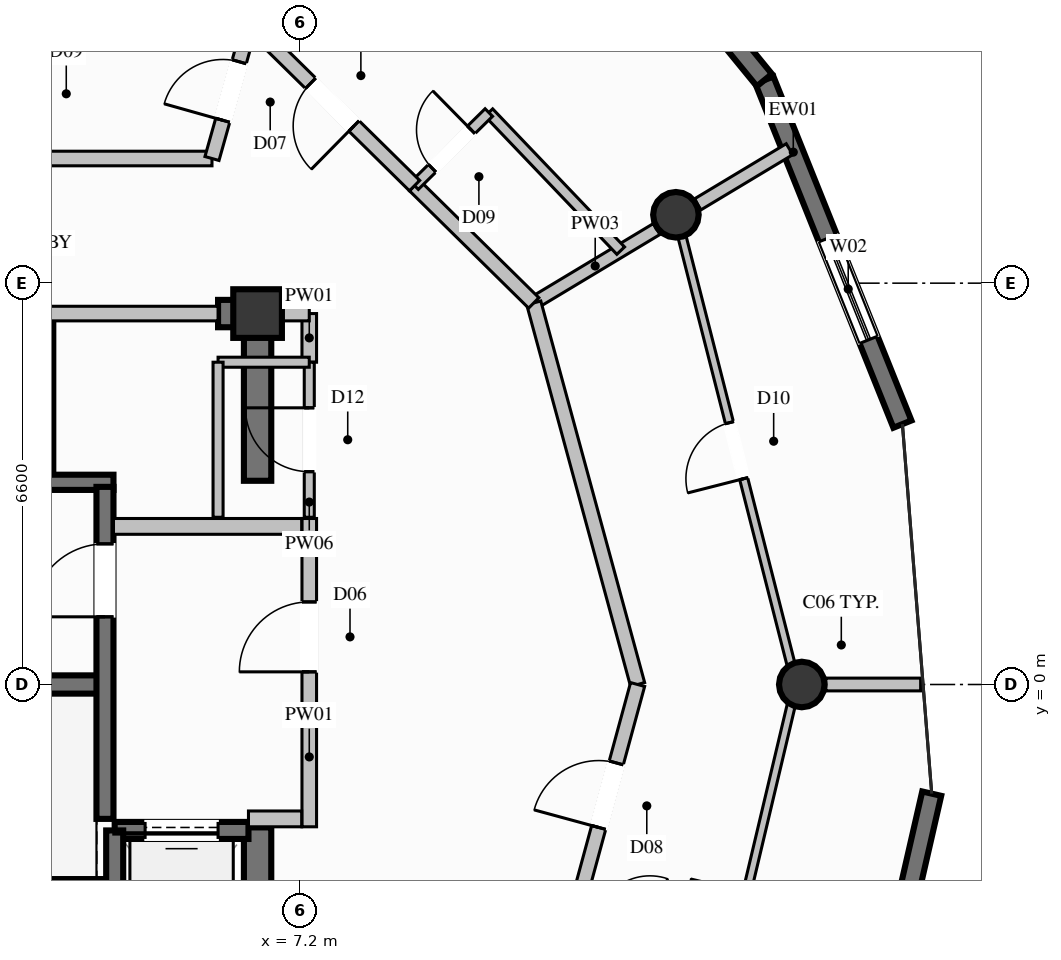
"""IFC4 building model, lengths in metres.
Left out: names, types, materials, properties, quantities, classifications, styles, units other than length and angle.
Written with IfcOpenShell. Run it as: python <this file> out.ifc"""

import sys

from ifc_helpers import new_model, si_unit, direction, frame, frame_2d, origin, origin_2d, place, context, subcontext, project, spatial, rectangle, circle, extrude, element, fill, save


model = new_model("IFC4")
c1 = context("Model", 3, precision=1e-05, world=origin(), true_north=direction((0.0, 1.0)))
c2 = subcontext(c1, "Body", "Model", "MODEL_VIEW")
j1 = project(units=[si_unit("LENGTHUNIT", "METRE"), si_unit("PLANEANGLEUNIT", "RADIAN")], contexts=[c1])
p1 = place(None, origin())
s1 = spatial("IfcSite", under=j1, at=p1, CompositionType="ELEMENT")
p2 = place(p1, origin())
s2 = spatial("IfcBuilding", under=s1, at=p2, CompositionType="ELEMENT")
p3 = place(p2, frame((0.0, 0.0, 246.8)))
s3 = spatial("IfcBuildingStorey", under=s2, at=p3, CompositionType="ELEMENT", Elevation=246.8)
p4 = place(p3, frame((6.5, 6.1, 0.0), z_axis=(0.0, 0.0, 1.0), x_axis=(1.0, 0.0, 0.0)))
e1 = element("IfcColumn", 1, at=p4, inside=s3, PredefinedType="COLUMN", context=c2, shape_type="SweptSolid", body=[
    extrude(rectangle(XDim=0.8, YDim=0.8, at=origin_2d()), origin(), (0.0, 0.0, 1.0), 3.8),
])
p5 = place(p3, frame((-3.99, 0.0, 0.0), z_axis=(0.0, 0.0, 1.0), x_axis=(1.0, 0.0, 0.0)))
e2 = element("IfcWall", 2, at=p5, inside=s3, PredefinedType="SHEAR", context=c2, shape_type="SweptSolid", body=[
    extrude(rectangle(XDim=7.98, YDim=0.3, at=frame_2d((3.99, 0.0))), origin(), (0.0, 0.0, 1.0), 3.8),
])
for number, where, z_axis, x_axis in (
    (3, (-4.13, -3.325, 0.0), (0.0, 0.0, 1.0), (1.0, 0.0, 0.0)),
    (4, (-4.13, 3.325, 0.0), (0.0, 0.0, 1.0), (1.0, 0.0, 0.0)),
):
    element("IfcWall", number, at=place(p3, frame(where, z_axis=z_axis, x_axis=x_axis)), inside=s3, PredefinedType="SOLIDWALL", context=c2, shape_type="SweptSolid", body=[
        extrude(rectangle(XDim=8.26, YDim=0.25, at=frame_2d((4.13, 0.0))), origin(), (0.0, 0.0, 1.0), 3.8),
    ])
p6 = place(p3, frame((5.85, 6.1, 0.0), z_axis=(0.0, 0.0, 1.0), x_axis=(1.0, 0.0, 0.0)))
e5 = element("IfcWall", 5, at=p6, inside=s3, PredefinedType="SHEAR", context=c2, shape_type="SweptSolid", body=[
    extrude(rectangle(XDim=0.425, YDim=0.45, at=frame_2d((0.212, 0.0))), origin(), (0.0, 0.0, 1.0), 3.8),
])
p7 = place(p3, frame((6.5, -6.325, 0.0), z_axis=(0.0, 0.0, 1.0), x_axis=(0.0, 1.0, 0.0)))
e6 = element("IfcWall", 6, at=p7, inside=s3, PredefinedType="SHEAR", context=c2, shape_type="SweptSolid", body=[
    extrude(rectangle(XDim=3.975, YDim=0.45, at=frame_2d((1.987, 0.0))), origin(), (0.0, 0.0, 1.0), 3.8),
])
p8 = place(p3, frame((6.5, 3.35, 0.0), z_axis=(0.0, 0.0, 1.0), x_axis=(0.0, 1.0, 0.0)))
e7 = element("IfcWall", 7, at=p8, inside=s3, PredefinedType="SHEAR", context=c2, shape_type="SweptSolid", body=[
    extrude(rectangle(XDim=2.975, YDim=0.45, at=frame_2d((1.487, 0.0))), origin(), (0.0, 0.0, 1.0), 3.8),
])
for number, where, z_axis, x_axis in (
    (8, (15.45, 0.0, 0.0), (0.0, 0.0, 1.0), (1.0, 0.0, 0.0)),
    (9, (13.38, 7.725, 0.0), (0.0, 0.0, 1.0), (1.0, 0.0, 0.0)),
):
    element("IfcColumn", number, at=place(p3, frame(where, z_axis=z_axis, x_axis=x_axis)), inside=s3, PredefinedType="COLUMN", context=c2, shape_type="SweptSolid", body=[
        extrude(circle(Radius=0.375, at=origin_2d()), origin(), (0.0, 0.0, 1.0), 3.8),
    ])
p9 = place(p3, frame((17.587, -1.795, 0.0), z_axis=(0.0, 0.0, 1.0), x_axis=(-0.223174159959, -0.974778587335, 0.0)))
e10 = element("IfcWall", 10, at=p9, inside=s3, PredefinedType="SOLIDWALL", context=c2, shape_type="SweptSolid", body=[
    extrude(rectangle(XDim=6.053, YDim=0.32, at=frame_2d((3.026, 0.0))), origin(), (0.0, 0.0, 1.0), 3.57),
])
p10 = place(p9, frame((2.126, 0.0, 0.35)))
e11 = element("IfcOpeningElement", 11, at=p10, cuts=e10, PredefinedType="OPENING", context=c2, shape_type="SweptSolid", body=[
    extrude(rectangle(XDim=1.8, YDim=2.6, at=frame_2d((0.9, 1.3))), frame((0.0, 0.17, 0.0), z_axis=(0.0, -1.0, 0.0), x_axis=(1.0, 0.0, 0.0)), (0.0, 0.0, 1.0), 0.34),
])
p11 = place(p3, frame((14.835, 9.939, 0.0), z_axis=(0.0, 0.0, 1.0), x_axis=(0.372412492589, -0.928067311871, 0.0)))
e12 = element("IfcWall", 12, at=p11, inside=s3, PredefinedType="SOLIDWALL", context=c2, shape_type="SweptSolid", body=[
    extrude(rectangle(XDim=6.095, YDim=0.32, at=frame_2d((3.048, 0.0))), origin(), (0.0, 0.0, 1.0), 3.57),
])
p12 = place(p11, frame((2.802, 0.0, 0.35)))
e13 = element("IfcOpeningElement", 13, at=p12, cuts=e12, PredefinedType="OPENING", context=c2, shape_type="SweptSolid", body=[
    extrude(rectangle(XDim=1.8, YDim=2.6, at=frame_2d((0.9, 1.3))), frame((0.0, 0.17, 0.0), z_axis=(0.0, -1.0, 0.0), x_axis=(1.0, 0.0, 0.0)), (0.0, 0.0, 1.0), 0.34),
])
p13 = place(p3, frame((11.001, 14.623, 0.0), z_axis=(0.0, 0.0, 1.0), x_axis=(0.633391522875, -0.773831492478, 0.0)))
e14 = element("IfcWall", 14, at=p13, inside=s3, PredefinedType="SOLIDWALL", context=c2, shape_type="SweptSolid", body=[
    extrude(rectangle(XDim=6.053, YDim=0.32, at=frame_2d((3.027, 0.0))), origin(), (0.0, 0.0, 1.0), 3.57),
])
p14 = place(p13, frame((2.127, 0.0, 0.35)))
e15 = element("IfcOpeningElement", 15, at=p14, cuts=e14, PredefinedType="OPENING", context=c2, shape_type="SweptSolid", body=[
    extrude(rectangle(XDim=1.8, YDim=2.6, at=frame_2d((0.9, 1.3))), frame((0.0, 0.17, 0.0), z_axis=(0.0, -1.0, 0.0), x_axis=(1.0, 0.0, 0.0)), (0.0, 0.0, 1.0), 0.34),
])
p15 = place(p3, frame((3.0, 3.5, 0.0), z_axis=(0.0, 0.0, 1.0), x_axis=(0.0, 1.0, 0.0)))
e16 = element("IfcWall", 16, at=p15, inside=s3, PredefinedType="SOLIDWALL", context=c2, shape_type="SweptSolid", body=[
    extrude(rectangle(XDim=2.5, YDim=0.28, at=frame_2d((1.25, 0.0))), origin(), (0.0, 0.0, 1.0), 3.57),
])
p16 = place(p3, frame((6.35, -2.4, 0.0), z_axis=(0.0, 0.0, 1.0), x_axis=(-1.0, 0.0, 0.0)))
e17 = element("IfcWall", 17, at=p16, inside=s3, PredefinedType="SOLIDWALL", context=c2, shape_type="SweptSolid", body=[
    extrude(rectangle(XDim=2.2, YDim=0.28, at=frame_2d((1.1, 0.0))), origin(), (0.0, 0.0, 1.0), 3.57),
])
p17 = place(p16, frame((0.5, 0.0, 0.0)))
e18 = element("IfcOpeningElement", 18, at=p17, cuts=e17, PredefinedType="OPENING", context=c2, shape_type="SweptSolid", body=[
    extrude(rectangle(XDim=1.2, YDim=2.2, at=frame_2d((0.6, 1.1))), frame((0.0, 0.15, 0.0), z_axis=(0.0, -1.0, 0.0), x_axis=(1.0, 0.0, 0.0)), (0.0, 0.0, 1.0), 0.3),
])
p18 = place(p3, frame((4.15, -2.4, 0.0), z_axis=(0.0, 0.0, 1.0), x_axis=(0.0, -1.0, 0.0)))
e19 = element("IfcWall", 19, at=p18, inside=s3, PredefinedType="SOLIDWALL", context=c2, shape_type="SweptSolid", body=[
    extrude(rectangle(XDim=2.7, YDim=0.28, at=frame_2d((1.35, 0.0))), origin(), (0.0, 0.0, 1.0), 3.57),
])
p19 = place(p3, frame((3.99, -2.21, 0.0), z_axis=(0.0, 0.0, 1.0), x_axis=(0.0, 1.0, 0.0)))
e20 = element("IfcWall", 20, at=p19, inside=s3, PredefinedType="SOLIDWALL", context=c2, shape_type="SweptSolid", body=[
    extrude(rectangle(XDim=5.46, YDim=0.28, at=frame_2d((2.73, 0.0))), origin(), (0.0, 0.0, 1.0), 3.57),
])
p20 = place(p19, frame((3.323, 0.0, 0.0)))
e21 = element("IfcOpeningElement", 21, at=p20, cuts=e20, PredefinedType="OPENING", context=c2, shape_type="SweptSolid", body=[
    extrude(rectangle(XDim=1.2, YDim=2.2, at=frame_2d((0.6, 1.1))), frame((0.0, 0.15, 0.0), z_axis=(0.0, -1.0, 0.0), x_axis=(1.0, 0.0, 0.0)), (0.0, 0.0, 1.0), 0.3),
])
p21 = place(p3, frame((7.35, -2.34, 0.0), z_axis=(0.0, 0.0, 1.0), x_axis=(0.0, 1.0, 0.0)))
e22 = element("IfcWall", 22, at=p21, inside=s3, PredefinedType="PARTITIONING", context=c2, shape_type="SweptSolid", body=[
    extrude(rectangle(XDim=5.07, YDim=0.24, at=frame_2d((2.535, 0.0))), origin(), (0.0, 0.0, 1.0), 2.655),
])
p22 = place(p21, frame((2.548, 0.0, 0.0)))
e23 = element("IfcOpeningElement", 23, at=p22, cuts=e22, PredefinedType="OPENING", context=c2, shape_type="SweptSolid", body=[
    extrude(rectangle(XDim=1.15, YDim=2.2, at=frame_2d((0.575, 1.1))), frame((0.0, 0.13, 0.0), z_axis=(0.0, -1.0, 0.0), x_axis=(1.0, 0.0, 0.0)), (0.0, 0.0, 1.0), 0.26),
])
p23 = place(p3, frame((6.35, -2.21, 0.0), z_axis=(0.0, 0.0, 1.0), x_axis=(1.0, 0.0, 0.0)))
e24 = element("IfcWall", 24, at=p23, inside=s3, PredefinedType="PARTITIONING", context=c2, shape_type="SweptSolid", body=[
    extrude(rectangle(XDim=0.875, YDim=0.26, at=frame_2d((0.438, 0.0))), origin(), (0.0, 0.0, 1.0), 3.57),
])
p24 = place(p3, frame((4.13, 2.6, 0.0), z_axis=(0.0, 0.0, 1.0), x_axis=(1.0, 0.0, 0.0)))
e25 = element("IfcWall", 25, at=p24, inside=s3, PredefinedType="PARTITIONING", context=c2, shape_type="SweptSolid", body=[
    extrude(rectangle(XDim=3.095, YDim=0.26, at=frame_2d((1.548, 0.0))), origin(), (0.0, 0.0, 1.0), 3.57),
])
p25 = place(p3, frame((-5.75, 8.65, 0.0), z_axis=(0.0, 0.0, 1.0), x_axis=(1.0, 0.0, 0.0)))
e26 = element("IfcWall", 26, at=p25, inside=s3, PredefinedType="PARTITIONING", context=c2, shape_type="SweptSolid", body=[
    extrude(rectangle(XDim=11.5, YDim=0.24, at=frame_2d((5.75, 0.0))), origin(), (0.0, 0.0, 1.0), 3.57),
])
p26 = place(p3, frame((3.0, 6.1, 0.0), z_axis=(0.0, 0.0, 1.0), x_axis=(1.0, 0.0, 0.0)))
e27 = element("IfcWall", 27, at=p26, inside=s3, PredefinedType="PARTITIONING", context=c2, shape_type="SweptSolid", body=[
    extrude(rectangle(XDim=2.85, YDim=0.24, at=frame_2d((1.425, 0.0))), origin(), (0.0, 0.0, 1.0), 2.655),
])
p27 = place(p3, frame((7.35, 5.3, 0.0), z_axis=(0.0, 0.0, 1.0), x_axis=(0.0, 1.0, 0.0)))
e28 = element("IfcWall", 28, at=p27, inside=s3, PredefinedType="PARTITIONING", context=c2, shape_type="SweptSolid", body=[
    extrude(rectangle(XDim=0.8, YDim=0.24, at=frame_2d((0.4, 0.0))), origin(), (0.0, 0.0, 1.0), 2.655),
])
p28 = place(p3, frame((6.5, 6.1, 0.0), z_axis=(0.0, 0.0, 1.0), x_axis=(1.0, 0.0, 0.0)))
e29 = element("IfcWall", 29, at=p28, inside=s3, PredefinedType="PARTITIONING", context=c2, shape_type="SweptSolid", body=[
    extrude(rectangle(XDim=0.85, YDim=0.24, at=frame_2d((0.425, 0.0))), origin(), (0.0, 0.0, 1.0), 3.011),
])
p29 = place(p3, frame((7.35, 2.75, 0.0), z_axis=(0.0, 0.0, 1.0), x_axis=(0.0, 1.0, 0.0)))
e30 = element("IfcWall", 30, at=p29, inside=s3, PredefinedType="PARTITIONING", context=c2, shape_type="SweptSolid", body=[
    extrude(rectangle(XDim=2.55, YDim=0.165, at=frame_2d((1.275, 0.0))), origin(), (0.0, 0.0, 1.0), 3.57),
])
p30 = place(p29, frame((0.75, 0.0, 0.0)))
e31 = element("IfcOpeningElement", 31, at=p30, cuts=e30, PredefinedType="OPENING", context=c2, shape_type="SweptSolid", body=[
    extrude(rectangle(XDim=1.05, YDim=2.15, at=frame_2d((0.525, 1.075))), frame((0.0, 0.093, 0.0), z_axis=(0.0, -1.0, 0.0), x_axis=(1.0, 0.0, 0.0)), (0.0, 0.0, 1.0), 0.185),
])
p31 = place(p3, frame((7.35, 5.3, 0.0), z_axis=(0.0, 0.0, 1.0), x_axis=(-1.0, 0.0, 0.0)))
e32 = element("IfcWall", 32, at=p31, inside=s3, PredefinedType="PARTITIONING", context=c2, shape_type="SweptSolid", body=[
    extrude(rectangle(XDim=1.5, YDim=0.165, at=frame_2d((0.75, 0.0))), origin(), (0.0, 0.0, 1.0), 2.655),
])
p32 = place(p3, frame((5.85, 5.3, 0.0), z_axis=(0.0, 0.0, 1.0), x_axis=(0.0, -1.0, 0.0)))
e33 = element("IfcWall", 33, at=p32, inside=s3, PredefinedType="PARTITIONING", context=c2, shape_type="SweptSolid", body=[
    extrude(rectangle(XDim=2.55, YDim=0.165, at=frame_2d((1.275, 0.0))), origin(), (0.0, 0.0, 1.0), 2.655),
])
p33 = place(p3, frame((11.042, 6.275, 0.0), z_axis=(0.0, 0.0, 1.0), x_axis=(0.857026686246, 0.515272024335, 0.0)))
e34 = element("IfcWall", 34, at=p33, inside=s3, PredefinedType="PARTITIONING", context=c2, shape_type="SweptSolid", body=[
    extrude(rectangle(XDim=2.358, YDim=0.21, at=frame_2d((1.179, 0.0))), origin(), (0.0, 0.0, 1.0), 3.011),
])
p34 = place(p3, frame((13.737, 7.895, 0.0), z_axis=(0.0, 0.0, 1.0), x_axis=(0.857150569961, 0.515065918514, 0.0)))
e35 = element("IfcWall", 35, at=p34, inside=s3, PredefinedType="PARTITIONING", context=c2, shape_type="SweptSolid", body=[
    extrude(rectangle(XDim=1.763, YDim=0.21, at=frame_2d((0.881, 0.0))), origin(), (0.0, 0.0, 1.0), 3.57),
])
p35 = place(p3, frame((5.75, 8.65, 0.0), z_axis=(0.0, 0.0, 1.0), x_axis=(0.271110513922, 0.962548226969, 0.0)))
e36 = element("IfcWall", 36, at=p35, inside=s3, PredefinedType="PARTITIONING", context=c2, shape_type="SweptSolid", body=[
    extrude(rectangle(XDim=2.305, YDim=0.24, at=frame_2d((1.153, 0.0))), origin(), (0.0, 0.0, 1.0), 3.57),
])
p36 = place(p35, frame((0.653, 0.0, 0.0)))
e37 = element("IfcOpeningElement", 37, at=p36, cuts=e36, PredefinedType="OPENING", context=c2, shape_type="SweptSolid", body=[
    extrude(rectangle(XDim=1.0, YDim=2.2, at=frame_2d((0.5, 1.1))), frame((0.0, 0.13, 0.0), z_axis=(0.0, -1.0, 0.0), x_axis=(1.0, 0.0, 0.0)), (0.0, 0.0, 1.0), 0.26),
])
p37 = place(p3, frame((15.845, 0.0, 0.0), z_axis=(0.0, 0.0, 1.0), x_axis=(1.0, 0.0, 0.0)))
e38 = element("IfcWall", 38, at=p37, inside=s3, PredefinedType="PARTITIONING", context=c2, shape_type="SweptSolid", body=[
    extrude(rectangle(XDim=1.56, YDim=0.21, at=frame_2d((0.78, 0.0))), origin(), (0.0, 0.0, 1.0), 3.57),
])
p38 = place(p3, frame((12.75, 0.0, 0.0), z_axis=(0.0, 0.0, 1.0), x_axis=(-0.262640884433, 0.964893655189, 0.0)))
e39 = element("IfcWall", 39, at=p38, inside=s3, PredefinedType="PARTITIONING", context=c2, shape_type="SweptSolid", body=[
    extrude(rectangle(XDim=6.503, YDim=0.24, at=frame_2d((3.251, 0.0))), origin(), (0.0, 0.0, 1.0), 3.57),
])
p39 = place(p3, frame((11.759, -3.64, 0.0), z_axis=(0.0, 0.0, 1.0), x_axis=(0.2626902414, 0.964880219029, 0.0)))
e40 = element("IfcWall", 40, at=p39, inside=s3, PredefinedType="PARTITIONING", context=c2, shape_type="SweptSolid", body=[
    extrude(rectangle(XDim=3.772, YDim=0.24, at=frame_2d((1.886, 0.0))), origin(), (0.0, 0.0, 1.0), 3.57),
])
p40 = place(p39, frame((1.336, 0.0, 0.0)))
e41 = element("IfcOpeningElement", 41, at=p40, cuts=e40, PredefinedType="OPENING", context=c2, shape_type="SweptSolid", body=[
    extrude(rectangle(XDim=1.1, YDim=2.3, at=frame_2d((0.55, 1.15))), frame((0.0, 0.13, 0.0), z_axis=(0.0, -1.0, 0.0), x_axis=(1.0, 0.0, 0.0)), (0.0, 0.0, 1.0), 0.26),
])
p41 = place(p3, frame((13.516, -7.759, 0.0), z_axis=(0.0, 0.0, 1.0), x_axis=(0.230840940032, 0.972991500685, 0.0)))
e42 = element("IfcWall", 42, at=p41, inside=s3, PredefinedType="PARTITIONING", context=c2, shape_type="SweptSolid", body=[
    extrude(rectangle(XDim=7.974, YDim=0.135, at=frame_2d((3.987, 0.0))), origin(), (0.0, 0.0, 1.0), 3.139),
])
p42 = place(p41, frame((3.512, 0.0, 0.0)))
e43 = element("IfcOpeningElement", 43, at=p42, cuts=e42, PredefinedType="OPENING", context=c2, shape_type="SweptSolid", body=[
    extrude(rectangle(XDim=0.95, YDim=2.1, at=frame_2d((0.475, 1.05))), frame((0.0, 0.078, 0.0), z_axis=(0.0, -1.0, 0.0), x_axis=(1.0, 0.0, 0.0)), (0.0, 0.0, 1.0), 0.155),
])
p43 = place(p3, frame((15.357, 0.0, 0.0), z_axis=(0.0, 0.0, 1.0), x_axis=(-0.246948201866, 0.969028681513, 0.0)))
e44 = element("IfcWall", 44, at=p43, inside=s3, PredefinedType="PARTITIONING", context=c2, shape_type="SweptSolid", body=[
    extrude(rectangle(XDim=7.937, YDim=0.135, at=frame_2d((3.968, 0.0))), origin(), (0.0, 0.0, 1.0), 3.139),
])
p44 = place(p43, frame((3.493, 0.0, 0.0)))
e45 = element("IfcOpeningElement", 45, at=p44, cuts=e44, PredefinedType="OPENING", context=c2, shape_type="SweptSolid", body=[
    extrude(rectangle(XDim=0.95, YDim=2.1, at=frame_2d((0.475, 1.05))), frame((0.0, 0.078, 0.0), z_axis=(0.0, -1.0, 0.0), x_axis=(1.0, 0.0, 0.0)), (0.0, 0.0, 1.0), 0.155),
])
p45 = place(p3, frame((11.042, 6.275, 0.0), z_axis=(0.0, 0.0, 1.0), x_axis=(-0.712677423321, 0.701491903224, 0.0)))
e46 = element("IfcWall", 46, at=p45, inside=s3, PredefinedType="PARTITIONING", context=c2, shape_type="SweptSolid", body=[
    extrude(rectangle(XDim=2.75, YDim=0.24, at=frame_2d((1.375, 0.0))), origin(), (0.0, 0.0, 1.0), 3.57),
])
p46 = place(p3, frame((12.472, 7.135, 0.0), z_axis=(0.0, 0.0, 1.0), x_axis=(-0.690671718567, 0.723168429324, 0.0)))
e47 = element("IfcWall", 47, at=p46, inside=s3, PredefinedType="PLUMBINGWALL", context=c2, shape_type="SweptSolid", body=[
    extrude(rectangle(XDim=3.14, YDim=0.175, at=frame_2d((1.57, 0.0))), origin(), (0.0, 0.0, 1.0), 3.57),
])
p47 = place(p3, frame((9.082, 8.204, 0.0), z_axis=(0.0, 0.0, 1.0), x_axis=(0.712642440828, 0.701527441751, 0.0)))
e48 = element("IfcWall", 48, at=p47, inside=s3, PredefinedType="PLUMBINGWALL", context=c2, shape_type="SweptSolid", body=[
    extrude(rectangle(XDim=1.713, YDim=0.175, at=frame_2d((0.857, 0.0))), origin(), (0.0, 0.0, 1.0), 3.57),
])
p48 = place(p47, frame((0.407, 0.0, 0.0)))
e49 = element("IfcOpeningElement", 49, at=p48, cuts=e48, PredefinedType="OPENING", context=c2, shape_type="SweptSolid", body=[
    extrude(rectangle(XDim=0.9, YDim=2.1, at=frame_2d((0.45, 1.05))), frame((0.0, 0.098, 0.0), z_axis=(0.0, -1.0, 0.0), x_axis=(1.0, 0.0, 0.0)), (0.0, 0.0, 1.0), 0.195),
])
p49 = place(p3, frame((9.082, 8.204, 0.0), z_axis=(0.0, 0.0, 1.0), x_axis=(-0.712644426178, 0.70152542494, 0.0)))
e50 = element("IfcWall", 50, at=p49, inside=s3, PredefinedType="PARTITIONING", context=c2, shape_type="SweptSolid", body=[
    extrude(rectangle(XDim=3.799, YDim=0.24, at=frame_2d((1.899, 0.0))), origin(), (0.0, 0.0, 1.0), 3.57),
])
p50 = place(p49, frame((1.399, 0.0, 0.0)))
e51 = element("IfcOpeningElement", 51, at=p50, cuts=e50, PredefinedType="OPENING", context=c2, shape_type="SweptSolid", body=[
    extrude(rectangle(XDim=1.0, YDim=2.2, at=frame_2d((0.5, 1.1))), frame((0.0, 0.13, 0.0), z_axis=(0.0, -1.0, 0.0), x_axis=(1.0, 0.0, 0.0)), (0.0, 0.0, 1.0), 0.26),
])
p51 = place(p12, origin())
e52 = element("IfcWindow", 52, at=p51, inside=s3, PartitioningType="SINGLE_PANEL", PredefinedType="WINDOW", context=c2, shape_type="SweptSolid", body=[
    extrude(rectangle(XDim=1.8, YDim=2.6, at=frame_2d((0.9, 1.3))), frame((0.0, 0.03, 0.0), z_axis=(0.0, -1.0, 0.0), x_axis=(1.0, 0.0, 0.0)), (0.0, 0.0, 1.0), 0.06),
])
fill(e13, e52)
p52 = place(p17, origin())
e53 = element("IfcDoor", 53, at=p52, inside=s3, OperationType="SLIDING_TO_LEFT", PredefinedType="DOOR", context=c2, shape_type="SweptSolid", body=[
    extrude(rectangle(XDim=1.2, YDim=2.2, at=frame_2d((0.6, 1.1))), frame((0.0, 0.025, 0.0), z_axis=(0.0, -1.0, 0.0), x_axis=(1.0, 0.0, 0.0)), (0.0, 0.0, 1.0), 0.05),
])
fill(e18, e53)
p53 = place(p20, origin())
e54 = element("IfcDoor", 54, at=p53, inside=s3, OperationType="SINGLE_SWING_LEFT", PredefinedType="DOOR", context=c2, shape_type="SweptSolid", body=[
    extrude(rectangle(XDim=1.2, YDim=2.2, at=frame_2d((0.6, 1.1))), frame((0.0, 0.025, 0.0), z_axis=(0.0, -1.0, 0.0), x_axis=(1.0, 0.0, 0.0)), (0.0, 0.0, 1.0), 0.05),
])
fill(e21, e54)
p54 = place(p22, origin())
e55 = element("IfcDoor", 55, at=p54, inside=s3, OperationType="SINGLE_SWING_LEFT", PredefinedType="DOOR", context=c2, shape_type="SweptSolid", body=[
    extrude(rectangle(XDim=1.15, YDim=2.2, at=frame_2d((0.575, 1.1))), frame((0.0, 0.025, 0.0), z_axis=(0.0, -1.0, 0.0), x_axis=(1.0, 0.0, 0.0)), (0.0, 0.0, 1.0), 0.05),
])
fill(e23, e55)
p55 = place(p30, origin())
e56 = element("IfcDoor", 56, at=p55, inside=s3, OperationType="SINGLE_SWING_RIGHT", PredefinedType="DOOR", context=c2, shape_type="SweptSolid", body=[
    extrude(rectangle(XDim=1.05, YDim=2.15, at=frame_2d((0.525, 1.075))), frame((0.0, 0.025, 0.0), z_axis=(0.0, -1.0, 0.0), x_axis=(1.0, 0.0, 0.0)), (0.0, 0.0, 1.0), 0.05),
])
fill(e31, e56)
p56 = place(p36, origin())
e57 = element("IfcDoor", 57, at=p56, inside=s3, OperationType="SINGLE_SWING_LEFT", PredefinedType="DOOR", context=c2, shape_type="SweptSolid", body=[
    extrude(rectangle(XDim=1.0, YDim=2.2, at=frame_2d((0.5, 1.1))), frame((0.0, 0.025, 0.0), z_axis=(0.0, -1.0, 0.0), x_axis=(1.0, 0.0, 0.0)), (0.0, 0.0, 1.0), 0.05),
])
fill(e37, e57)
p57 = place(p40, origin())
e58 = element("IfcDoor", 58, at=p57, inside=s3, OperationType="SINGLE_SWING_LEFT", PredefinedType="DOOR", context=c2, shape_type="SweptSolid", body=[
    extrude(rectangle(XDim=1.1, YDim=2.3, at=frame_2d((0.55, 1.15))), frame((0.0, 0.025, 0.0), z_axis=(0.0, -1.0, 0.0), x_axis=(1.0, 0.0, 0.0)), (0.0, 0.0, 1.0), 0.05),
])
fill(e41, e58)
p58 = place(p44, origin())
e59 = element("IfcDoor", 59, at=p58, inside=s3, OperationType="SINGLE_SWING_LEFT", PredefinedType="DOOR", context=c2, shape_type="SweptSolid", body=[
    extrude(rectangle(XDim=0.95, YDim=2.1, at=frame_2d((0.475, 1.05))), frame((0.0, 0.025, 0.0), z_axis=(0.0, -1.0, 0.0), x_axis=(1.0, 0.0, 0.0)), (0.0, 0.0, 1.0), 0.05),
])
fill(e45, e59)
p59 = place(p48, origin())
e60 = element("IfcDoor", 60, at=p59, inside=s3, OperationType="SINGLE_SWING_RIGHT", PredefinedType="DOOR", context=c2, shape_type="SweptSolid", body=[
    extrude(rectangle(XDim=0.9, YDim=2.1, at=frame_2d((0.45, 1.05))), frame((0.0, 0.025, 0.0), z_axis=(0.0, -1.0, 0.0), x_axis=(1.0, 0.0, 0.0)), (0.0, 0.0, 1.0), 0.05),
])
fill(e49, e60)
p60 = place(p50, origin())
e61 = element("IfcDoor", 61, at=p60, inside=s3, OperationType="SINGLE_SWING_LEFT", PredefinedType="DOOR", context=c2, shape_type="SweptSolid", body=[
    extrude(rectangle(XDim=1.0, YDim=2.2, at=frame_2d((0.5, 1.1))), frame((0.0, 0.025, 0.0), z_axis=(0.0, -1.0, 0.0), x_axis=(1.0, 0.0, 0.0)), (0.0, 0.0, 1.0), 0.05),
])
fill(e51, e61)
save(model, sys.argv[1])
